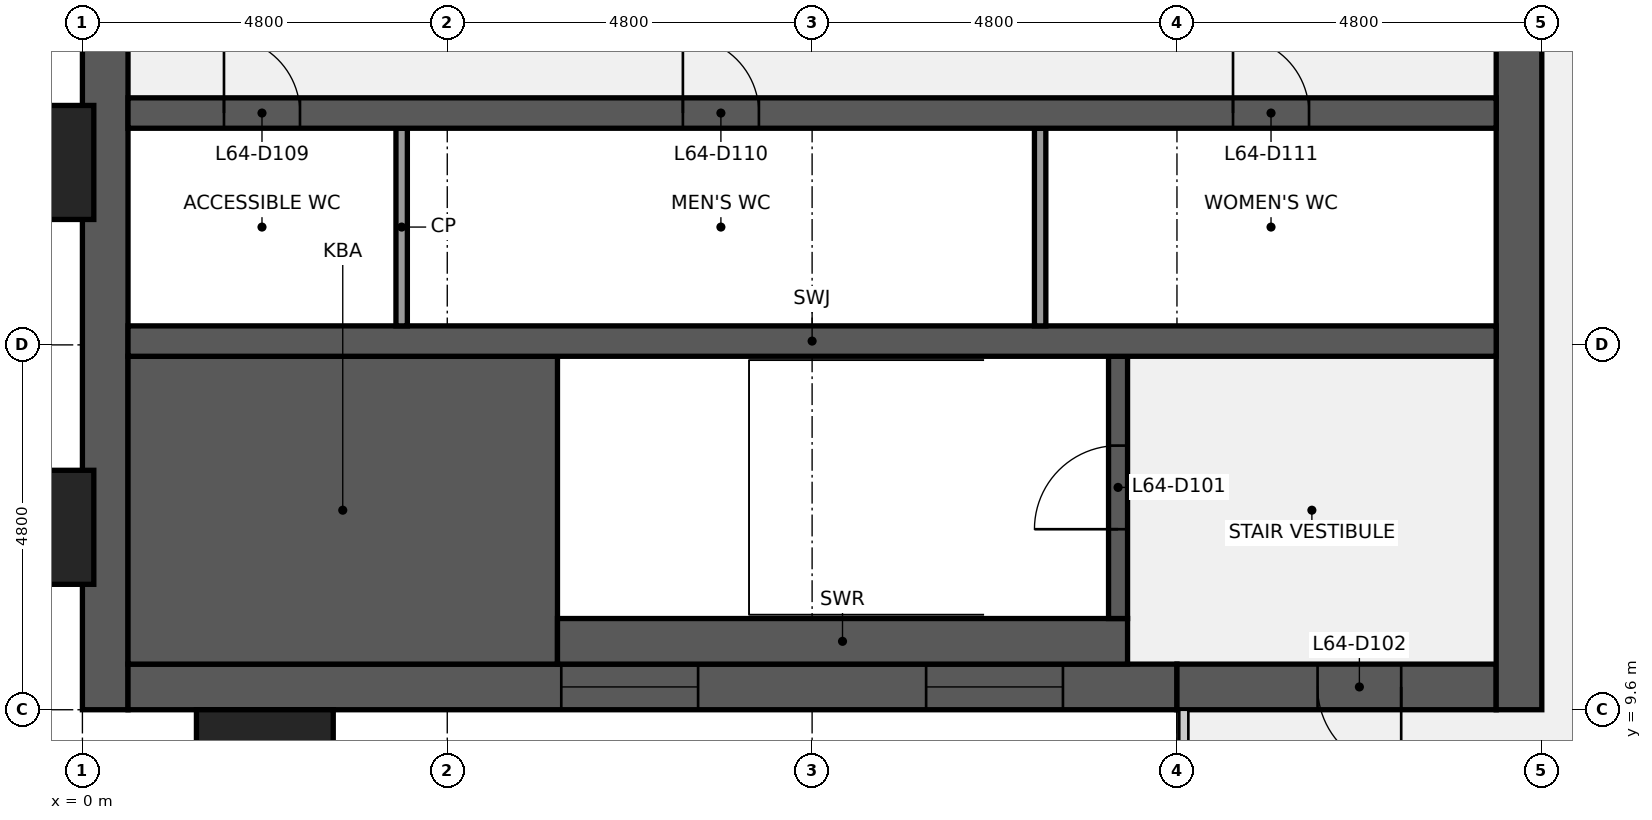
"""IFC4 building model, lengths in metres.
Left out: names, types, materials, properties, quantities, classifications, styles, units other than length and angle.
Written with IfcOpenShell. Run it as: python <this file> out.ifc"""

import sys

from ifc_helpers import new_model, si_unit, direction, frame, frame_2d, origin, origin_2d, place, context, subcontext, project, spatial, rectangle, extrude, element, fill, save


model = new_model("IFC4")
c1 = context("Model", 3, precision=1e-05, world=origin(), true_north=direction((0.0, 1.0)))
c2 = subcontext(c1, "Body", "Model", "MODEL_VIEW")
j1 = project(units=[si_unit("LENGTHUNIT", "METRE"), si_unit("PLANEANGLEUNIT", "RADIAN")], contexts=[c1])
p1 = place(None, origin())
s1 = spatial("IfcSite", under=j1, at=p1, CompositionType="ELEMENT")
p2 = place(p1, origin())
s2 = spatial("IfcBuilding", under=s1, at=p2, CompositionType="ELEMENT")
p3 = place(p2, frame((0.0, 0.0, 294.3)))
s3 = spatial("IfcBuildingStorey", under=s2, at=p3, CompositionType="ELEMENT", Elevation=294.3)
p4 = place(p3, frame((0.3, 9.6, 0.0), z_axis=(0.0, 0.0, 1.0), x_axis=(0.0, 1.0, 0.0)))
e1 = element("IfcWall", 1, at=p4, inside=s3, PredefinedType="SHEAR", context=c2, shape_type="SweptSolid", body=[
    extrude(rectangle(XDim=28.8, YDim=0.6, at=frame_2d((14.4, 0.0))), origin(), (0.0, 0.0, 1.0), 3.84),
])
p5 = place(p4, frame((8.85, 0.0, 0.9)))
e2 = element("IfcOpeningElement", 2, at=p5, cuts=e1, PredefinedType="OPENING", context=c2, shape_type="SweptSolid", body=[
    extrude(rectangle(XDim=1.5, YDim=1.5, at=frame_2d((0.75, 0.75))), frame((0.0, 0.31, 0.0), z_axis=(0.0, -1.0, 0.0), x_axis=(1.0, 0.0, 0.0)), (0.0, 0.0, 1.0), 0.62),
])
p6 = place(p4, frame((18.45, 0.0, 0.9)))
e3 = element("IfcOpeningElement", 3, at=p6, cuts=e1, PredefinedType="OPENING", context=c2, shape_type="SweptSolid", body=[
    extrude(rectangle(XDim=1.5, YDim=1.5, at=frame_2d((0.75, 0.75))), frame((0.0, 0.31, 0.0), z_axis=(0.0, -1.0, 0.0), x_axis=(1.0, 0.0, 0.0)), (0.0, 0.0, 1.0), 0.62),
])
p7 = place(p3, frame((14.4, 9.9, 0.0), z_axis=(0.0, 0.0, 1.0), x_axis=(-1.0, 0.0, 0.0)))
e4 = element("IfcWall", 4, at=p7, inside=s3, PredefinedType="SHEAR", context=c2, shape_type="SweptSolid", body=[
    extrude(rectangle(XDim=13.8, YDim=0.6, at=frame_2d((6.9, 0.0))), origin(), (0.0, 0.0, 1.0), 3.84),
])
p8 = place(p7, frame((6.3, 0.0, 0.9)))
e5 = element("IfcOpeningElement", 5, at=p8, cuts=e4, PredefinedType="OPENING", context=c2, shape_type="SweptSolid", body=[
    extrude(rectangle(XDim=1.8, YDim=1.5, at=frame_2d((0.9, 0.75))), frame((0.0, 0.31, 0.0), z_axis=(0.0, -1.0, 0.0), x_axis=(1.0, 0.0, 0.0)), (0.0, 0.0, 1.0), 0.62),
])
p9 = place(p7, frame((1.5, 0.0, 0.9)))
e6 = element("IfcOpeningElement", 6, at=p9, cuts=e4, PredefinedType="OPENING", context=c2, shape_type="SweptSolid", body=[
    extrude(rectangle(XDim=1.8, YDim=1.5, at=frame_2d((0.9, 0.75))), frame((0.0, 0.31, 0.0), z_axis=(0.0, -1.0, 0.0), x_axis=(1.0, 0.0, 0.0)), (0.0, 0.0, 1.0), 0.62),
])
p10 = place(p3, frame((18.6, 9.9, 0.0), z_axis=(0.0, 0.0, 1.0), x_axis=(-1.0, 0.0, 0.0)))
e7 = element("IfcWall", 7, at=p10, inside=s3, PredefinedType="SHEAR", context=c2, shape_type="SweptSolid", body=[
    extrude(rectangle(XDim=4.2, YDim=0.6, at=frame_2d((2.1, 0.0))), origin(), (0.0, 0.0, 1.0), 3.84),
])
p11 = place(p10, frame((1.25, 0.0, 0.0)))
e8 = element("IfcOpeningElement", 8, at=p11, cuts=e7, PredefinedType="OPENING", context=c2, shape_type="SweptSolid", body=[
    extrude(rectangle(XDim=1.1, YDim=2.1, at=frame_2d((0.55, 1.05))), frame((0.0, 0.31, 0.0), z_axis=(0.0, -1.0, 0.0), x_axis=(1.0, 0.0, 0.0)), (0.0, 0.0, 1.0), 0.62),
])
p12 = place(p3, frame((18.9, 38.4, 0.0), z_axis=(0.0, 0.0, 1.0), x_axis=(0.0, -1.0, 0.0)))
e9 = element("IfcWall", 9, at=p12, inside=s3, PredefinedType="SHEAR", context=c2, shape_type="SweptSolid", body=[
    extrude(rectangle(XDim=28.8, YDim=0.6, at=frame_2d((14.4, 0.0))), origin(), (0.0, 0.0, 1.0), 3.84),
])
p13 = place(p12, frame((18.3, 0.0, 0.0)))
e10 = element("IfcOpeningElement", 10, at=p13, cuts=e9, PredefinedType="OPENING", context=c2, shape_type="SweptSolid", body=[
    extrude(rectangle(XDim=1.8, YDim=2.1, at=frame_2d((0.9, 1.05))), frame((0.0, 0.31, 0.0), z_axis=(0.0, -1.0, 0.0), x_axis=(1.0, 0.0, 0.0)), (0.0, 0.0, 1.0), 0.62),
])
p14 = place(p12, frame((8.7, 0.0, 0.0)))
e11 = element("IfcOpeningElement", 11, at=p14, cuts=e9, PredefinedType="OPENING", context=c2, shape_type="SweptSolid", body=[
    extrude(rectangle(XDim=1.8, YDim=2.1, at=frame_2d((0.9, 1.05))), frame((0.0, 0.31, 0.0), z_axis=(0.0, -1.0, 0.0), x_axis=(1.0, 0.0, 0.0)), (0.0, 0.0, 1.0), 0.62),
])
p15 = place(p3, frame((0.6, 12.225, 0.0), z_axis=(0.0, 0.0, 1.0), x_axis=(1.0, 0.0, 0.0)))
e12 = element("IfcWall", 12, at=p15, inside=s3, PredefinedType="SHEAR", context=c2, shape_type="SweptSolid", body=[
    extrude(rectangle(XDim=5.65, YDim=4.05, at=frame_2d((2.825, 0.0))), origin(), (0.0, 0.0, 1.0), 3.84),
])
p16 = place(p3, frame((6.25, 10.5, 0.0), z_axis=(0.0, 0.0, 1.0), x_axis=(1.0, 0.0, 0.0)))
e13 = element("IfcWall", 13, at=p16, inside=s3, PredefinedType="SHEAR", context=c2, shape_type="SweptSolid", body=[
    extrude(rectangle(XDim=7.5, YDim=0.6, at=frame_2d((3.75, 0.0))), origin(), (0.0, 0.0, 1.0), 3.84),
])
p17 = place(p3, frame((13.625, 10.8, 0.0), z_axis=(0.0, 0.0, 1.0), x_axis=(0.0, 1.0, 0.0)))
e14 = element("IfcWall", 14, at=p17, inside=s3, PredefinedType="SHEAR", context=c2, shape_type="SweptSolid", body=[
    extrude(rectangle(XDim=3.45, YDim=0.25, at=frame_2d((1.725, 0.0))), origin(), (0.0, 0.0, 1.0), 3.84),
])
p18 = place(p17, frame((1.175, 0.0, 0.0)))
e15 = element("IfcOpeningElement", 15, at=p18, cuts=e14, PredefinedType="OPENING", context=c2, shape_type="SweptSolid", body=[
    extrude(rectangle(XDim=1.1, YDim=2.1, at=frame_2d((0.55, 1.05))), frame((0.0, 0.135, 0.0), z_axis=(0.0, -1.0, 0.0), x_axis=(1.0, 0.0, 0.0)), (0.0, 0.0, 1.0), 0.27),
])
p19 = place(p3, frame((0.6, 14.45, 0.0), z_axis=(0.0, 0.0, 1.0), x_axis=(1.0, 0.0, 0.0)))
e16 = element("IfcWall", 16, at=p19, inside=s3, PredefinedType="SHEAR", context=c2, shape_type="SweptSolid", body=[
    extrude(rectangle(XDim=18.0, YDim=0.4, at=frame_2d((9.0, 0.0))), origin(), (0.0, 0.0, 1.0), 3.84),
])
for number, where, z_axis, x_axis in (
    (17, (4.2, 14.65, 0.0), (0.0, 0.0, 1.0), (0.0, 1.0, 0.0)),
    (18, (12.6, 14.65, 0.0), (0.0, 0.0, 1.0), (0.0, 1.0, 0.0)),
):
    element("IfcWall", number, at=place(p3, frame(where, z_axis=z_axis, x_axis=x_axis)), inside=s3, PredefinedType="PARTITIONING", context=c2, shape_type="SweptSolid", body=[
        extrude(rectangle(XDim=2.6, YDim=0.15, at=frame_2d((1.3, 0.0))), origin(), (0.0, 0.0, 1.0), 3.84),
    ])
p20 = place(p3, frame((0.6, 17.45, 0.0), z_axis=(0.0, 0.0, 1.0), x_axis=(1.0, 0.0, 0.0)))
e19 = element("IfcWall", 19, at=p20, inside=s3, PredefinedType="SHEAR", context=c2, shape_type="SweptSolid", body=[
    extrude(rectangle(XDim=18.0, YDim=0.4, at=frame_2d((9.0, 0.0))), origin(), (0.0, 0.0, 1.0), 3.84),
])
p21 = place(p20, frame((1.262, 0.0, 0.0)))
e20 = element("IfcOpeningElement", 20, at=p21, cuts=e19, PredefinedType="OPENING", context=c2, shape_type="SweptSolid", body=[
    extrude(rectangle(XDim=1.0, YDim=2.1, at=frame_2d((0.5, 1.05))), frame((0.0, 0.21, 0.0), z_axis=(0.0, -1.0, 0.0), x_axis=(1.0, 0.0, 0.0)), (0.0, 0.0, 1.0), 0.42),
])
p22 = place(p20, frame((7.3, 0.0, 0.0)))
e21 = element("IfcOpeningElement", 21, at=p22, cuts=e19, PredefinedType="OPENING", context=c2, shape_type="SweptSolid", body=[
    extrude(rectangle(XDim=1.0, YDim=2.1, at=frame_2d((0.5, 1.05))), frame((0.0, 0.21, 0.0), z_axis=(0.0, -1.0, 0.0), x_axis=(1.0, 0.0, 0.0)), (0.0, 0.0, 1.0), 0.42),
])
p23 = place(p20, frame((14.538, 0.0, 0.0)))
e22 = element("IfcOpeningElement", 22, at=p23, cuts=e19, PredefinedType="OPENING", context=c2, shape_type="SweptSolid", body=[
    extrude(rectangle(XDim=1.0, YDim=2.1, at=frame_2d((0.5, 1.05))), frame((0.0, 0.21, 0.0), z_axis=(0.0, -1.0, 0.0), x_axis=(1.0, 0.0, 0.0)), (0.0, 0.0, 1.0), 0.42),
])
for number, where, z_axis, x_axis in (
    (23, (-0.75, 12.0, 0.0), (0.0, 0.0, 1.0), (0.0, 1.0, 0.0)),
    (24, (-0.75, 16.8, 0.0), (0.0, 0.0, 1.0), (0.0, 1.0, 0.0)),
    (25, (2.4, 8.85, 0.0), (0.0, 0.0, 1.0), (1.0, 0.0, 0.0)),
):
    element("IfcColumn", number, at=place(p3, frame(where, z_axis=z_axis, x_axis=x_axis)), inside=s3, PredefinedType="PILASTER", context=c2, shape_type="SweptSolid", body=[
        extrude(rectangle(XDim=1.8, YDim=1.5, at=origin_2d()), origin(), (0.0, 0.0, 1.0), 4.0),
    ])
p24 = place(p18, origin())
e26 = element("IfcDoor", 26, at=p24, inside=s3, OperationType="SINGLE_SWING_LEFT", PredefinedType="DOOR", context=c2, shape_type="SweptSolid", body=[
    extrude(rectangle(XDim=1.1, YDim=2.1, at=frame_2d((0.55, 1.05))), frame((0.0, 0.025, 0.0), z_axis=(0.0, -1.0, 0.0), x_axis=(1.0, 0.0, 0.0)), (0.0, 0.0, 1.0), 0.05),
])
fill(e15, e26)
p25 = place(p11, origin())
e27 = element("IfcDoor", 27, at=p25, inside=s3, OperationType="SINGLE_SWING_LEFT", PredefinedType="DOOR", context=c2, shape_type="SweptSolid", body=[
    extrude(rectangle(XDim=1.1, YDim=2.1, at=frame_2d((0.55, 1.05))), frame((0.0, 0.025, 0.0), z_axis=(0.0, -1.0, 0.0), x_axis=(1.0, 0.0, 0.0)), (0.0, 0.0, 1.0), 0.05),
])
fill(e8, e27)
p26 = place(p21, origin())
e28 = element("IfcDoor", 28, at=p26, inside=s3, OperationType="SINGLE_SWING_LEFT", PredefinedType="DOOR", context=c2, shape_type="SweptSolid", body=[
    extrude(rectangle(XDim=1.0, YDim=2.1, at=frame_2d((0.5, 1.05))), frame((0.0, 0.025, 0.0), z_axis=(0.0, -1.0, 0.0), x_axis=(1.0, 0.0, 0.0)), (0.0, 0.0, 1.0), 0.05),
])
fill(e20, e28)
p27 = place(p22, origin())
e29 = element("IfcDoor", 29, at=p27, inside=s3, OperationType="SINGLE_SWING_LEFT", PredefinedType="DOOR", context=c2, shape_type="SweptSolid", body=[
    extrude(rectangle(XDim=1.0, YDim=2.1, at=frame_2d((0.5, 1.05))), frame((0.0, 0.025, 0.0), z_axis=(0.0, -1.0, 0.0), x_axis=(1.0, 0.0, 0.0)), (0.0, 0.0, 1.0), 0.05),
])
fill(e21, e29)
p28 = place(p23, origin())
e30 = element("IfcDoor", 30, at=p28, inside=s3, OperationType="SINGLE_SWING_LEFT", PredefinedType="DOOR", context=c2, shape_type="SweptSolid", body=[
    extrude(rectangle(XDim=1.0, YDim=2.1, at=frame_2d((0.5, 1.05))), frame((0.0, 0.025, 0.0), z_axis=(0.0, -1.0, 0.0), x_axis=(1.0, 0.0, 0.0)), (0.0, 0.0, 1.0), 0.05),
])
fill(e22, e30)
p29 = place(p8, origin())
e31 = element("IfcWindow", 31, at=p29, inside=s3, PartitioningType="SINGLE_PANEL", PredefinedType="WINDOW", context=c2, shape_type="SweptSolid", body=[
    extrude(rectangle(XDim=1.8, YDim=1.5, at=frame_2d((0.9, 0.75))), frame((0.0, 0.03, 0.0), z_axis=(0.0, -1.0, 0.0), x_axis=(1.0, 0.0, 0.0)), (0.0, 0.0, 1.0), 0.06),
])
fill(e5, e31)
p30 = place(p9, origin())
e32 = element("IfcWindow", 32, at=p30, inside=s3, PartitioningType="SINGLE_PANEL", PredefinedType="WINDOW", context=c2, shape_type="SweptSolid", body=[
    extrude(rectangle(XDim=1.8, YDim=1.5, at=frame_2d((0.9, 0.75))), frame((0.0, 0.03, 0.0), z_axis=(0.0, -1.0, 0.0), x_axis=(1.0, 0.0, 0.0)), (0.0, 0.0, 1.0), 0.06),
])
fill(e6, e32)
save(model, sys.argv[1])
